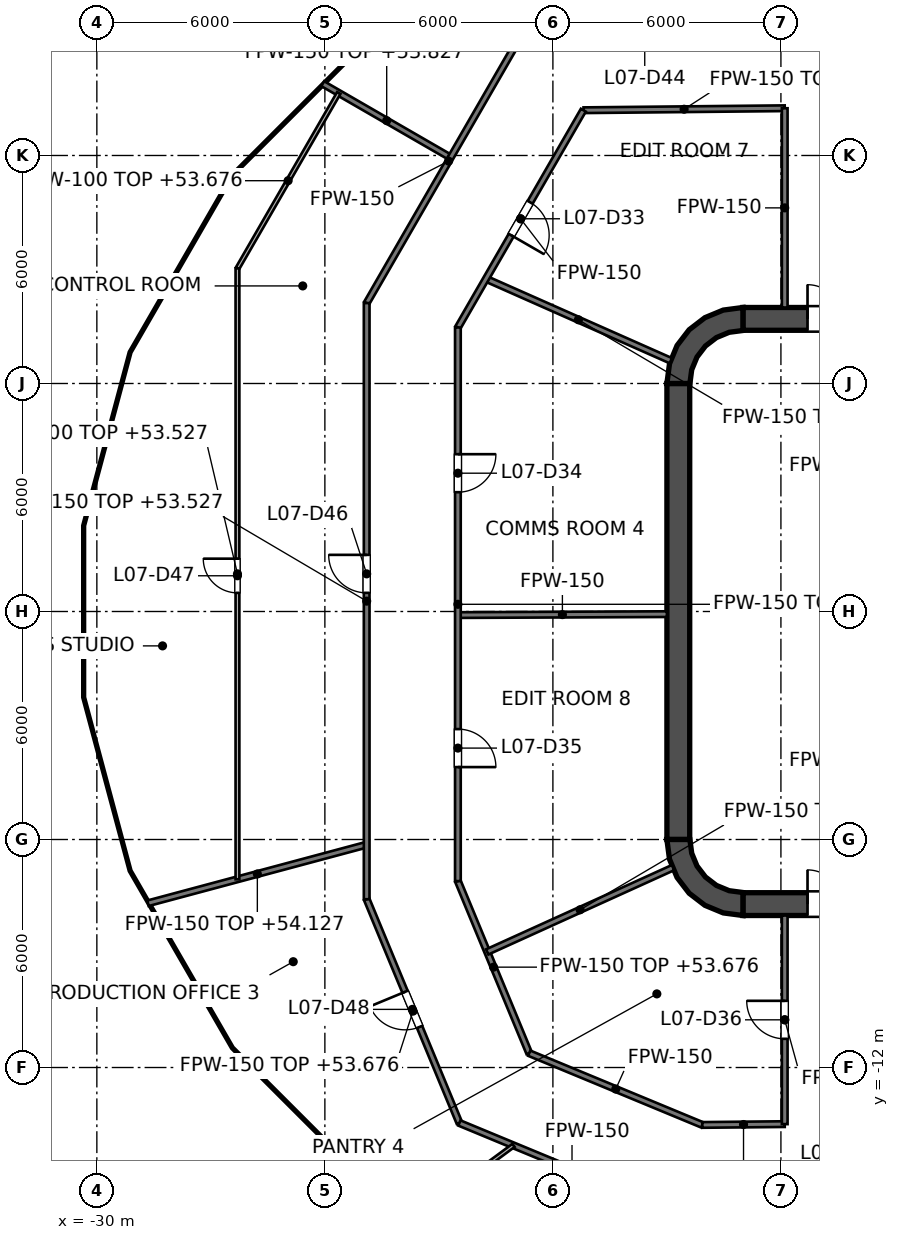
"""IFC4 building model, lengths in metres.
Left out: names, types, materials, properties, quantities, classifications, styles, units other than length and angle.
Written with IfcOpenShell. Run it as: python <this file> out.ifc"""

import sys

from ifc_helpers import new_model, si_unit, direction, frame, frame_2d, origin, place, context, subcontext, project, spatial, polyline, rectangle, outline, extrude, element, fill, save


model = new_model("IFC4")
c1 = context("Model", 3, precision=1e-05, world=origin(), true_north=direction((0.0, 1.0)))
c2 = subcontext(c1, "Body", "Model", "MODEL_VIEW")
j1 = project(units=[si_unit("LENGTHUNIT", "METRE"), si_unit("PLANEANGLEUNIT", "RADIAN")], contexts=[c1])
p1 = place(None, origin())
s1 = spatial("IfcSite", under=j1, at=p1, CompositionType="ELEMENT")
p2 = place(p1, origin())
s2 = spatial("IfcBuilding", under=s1, at=p2, CompositionType="ELEMENT")
p3 = place(p2, frame((0.0, 0.0, 50.4)))
s3 = spatial("IfcBuildingStorey", under=s2, at=p3, CompositionType="ELEMENT", Elevation=50.4)
p4 = place(p3, frame((-13.0, 7.7, 0.0), z_axis=(0.0, 0.0, 1.0), x_axis=(1.0, 0.0, 0.0)))
e1 = element("IfcWall", 1, at=p4, inside=s3, PredefinedType="SHEAR", context=c2, shape_type="SweptSolid", body=[
    extrude(rectangle(XDim=26.0, YDim=0.6, at=frame_2d((13.0, 0.0))), origin(), (0.0, 0.0, 1.0), 4.2),
])
p5 = place(p4, frame((1.7, 0.0, 0.0)))
e2 = element("IfcOpeningElement", 2, at=p5, cuts=e1, PredefinedType="OPENING", context=c2, shape_type="SweptSolid", body=[
    extrude(rectangle(XDim=1.8, YDim=2.1, at=frame_2d((0.9, 1.05))), frame((0.0, 0.3, 0.0), z_axis=(0.0, -1.0, 0.0), x_axis=(1.0, 0.0, 0.0)), (0.0, 0.0, 1.0), 0.6),
])
p6 = place(p4, frame((22.5, 0.0, 0.0)))
e3 = element("IfcOpeningElement", 3, at=p6, cuts=e1, PredefinedType="OPENING", context=c2, shape_type="SweptSolid", body=[
    extrude(rectangle(XDim=1.8, YDim=2.1, at=frame_2d((0.9, 1.05))), frame((0.0, 0.3, 0.0), z_axis=(0.0, -1.0, 0.0), x_axis=(1.0, 0.0, 0.0)), (0.0, 0.0, 1.0), 0.6),
])
p7 = place(p3, frame((-13.0, -7.7, 0.0), z_axis=(0.0, 0.0, 1.0), x_axis=(1.0, 0.0, 0.0)))
e4 = element("IfcWall", 4, at=p7, inside=s3, PredefinedType="SHEAR", context=c2, shape_type="SweptSolid", body=[
    extrude(rectangle(XDim=26.0, YDim=0.6, at=frame_2d((13.0, 0.0))), origin(), (0.0, 0.0, 1.0), 4.2),
])
p8 = place(p7, frame((1.7, 0.0, 0.0)))
e5 = element("IfcOpeningElement", 5, at=p8, cuts=e4, PredefinedType="OPENING", context=c2, shape_type="SweptSolid", body=[
    extrude(rectangle(XDim=1.8, YDim=2.1, at=frame_2d((0.9, 1.05))), frame((0.0, 0.3, 0.0), z_axis=(0.0, -1.0, 0.0), x_axis=(1.0, 0.0, 0.0)), (0.0, 0.0, 1.0), 0.6),
])
p9 = place(p7, frame((22.5, 0.0, 0.0)))
e6 = element("IfcOpeningElement", 6, at=p9, cuts=e4, PredefinedType="OPENING", context=c2, shape_type="SweptSolid", body=[
    extrude(rectangle(XDim=1.8, YDim=2.1, at=frame_2d((0.9, 1.05))), frame((0.0, 0.3, 0.0), z_axis=(0.0, -1.0, 0.0), x_axis=(1.0, 0.0, 0.0)), (0.0, 0.0, 1.0), 0.6),
])
p10 = place(p3, frame((-14.7, -6.0, 0.0), z_axis=(0.0, 0.0, 1.0), x_axis=(0.0, 1.0, 0.0)))
e7 = element("IfcWall", 7, at=p10, inside=s3, PredefinedType="SHEAR", context=c2, shape_type="SweptSolid", body=[
    extrude(rectangle(XDim=12.0, YDim=0.6, at=frame_2d((6.0, 0.0))), origin(), (0.0, 0.0, 1.0), 4.2),
])
p11 = place(p3, origin())
e8 = element("IfcWall", 8, at=p11, inside=s3, PredefinedType="SHEAR", context=c2, shape_type="SweptSolid", body=[
    extrude(outline(polyline([(-15.0, 6.0), (-14.395, 6.0), (-14.347, 6.361), (-14.208, 6.698), (-13.986, 6.986), (-13.698, 7.208), (-13.361, 7.347), (-13.0, 7.395), (-13.0, 8.0), (-13.518, 7.932), (-14.0, 7.732), (-14.414, 7.414), (-14.732, 7.0), (-14.932, 6.518), (-15.0, 6.0)])), origin(), (0.0, 0.0, 1.0), 4.2),
])
e9 = element("IfcWall", 9, at=p11, inside=s3, PredefinedType="SHEAR", context=c2, shape_type="SweptSolid", body=[
    extrude(outline(polyline([(-13.0, -8.0), (-13.0, -7.395), (-13.361, -7.347), (-13.698, -7.208), (-13.986, -6.986), (-14.208, -6.698), (-14.347, -6.361), (-14.395, -6.0), (-15.0, -6.0), (-14.932, -6.518), (-14.732, -7.0), (-14.414, -7.414), (-14.0, -7.732), (-13.518, -7.932), (-13.0, -8.0)])), origin(), (0.0, 0.0, 1.0), 4.2),
])
p12 = place(p3, frame((-11.8, -7.4, 0.0), z_axis=(0.0, 0.0, 1.0), x_axis=(0.0, 1.0, 0.0)))
e10 = element("IfcWall", 10, at=p12, inside=s3, PredefinedType="SOLIDWALL", context=c2, shape_type="SweptSolid", body=[
    extrude(rectangle(XDim=14.8, YDim=0.4, at=frame_2d((7.4, 0.0))), origin(), (0.0, 0.0, 1.0), 4.05),
])
p13 = place(p12, frame((11.2, 0.0, 0.0)))
e11 = element("IfcOpeningElement", 11, at=p13, cuts=e10, PredefinedType="OPENING", context=c2, shape_type="SweptSolid", body=[
    extrude(rectangle(XDim=1.1, YDim=2.1, at=frame_2d((0.55, 1.05))), frame((0.0, 0.2, 0.0), z_axis=(0.0, -1.0, 0.0), x_axis=(1.0, 0.0, 0.0)), (0.0, 0.0, 1.0), 0.4),
])
p14 = place(p12, frame((8.3, 0.0, 0.0)))
e12 = element("IfcOpeningElement", 12, at=p14, cuts=e10, PredefinedType="OPENING", context=c2, shape_type="SweptSolid", body=[
    extrude(rectangle(XDim=1.1, YDim=2.1, at=frame_2d((0.55, 1.05))), frame((0.0, 0.2, 0.0), z_axis=(0.0, -1.0, 0.0), x_axis=(1.0, 0.0, 0.0)), (0.0, 0.0, 1.0), 0.4),
])
p15 = place(p12, frame((5.4, 0.0, 0.0)))
e13 = element("IfcOpeningElement", 13, at=p15, cuts=e10, PredefinedType="OPENING", context=c2, shape_type="SweptSolid", body=[
    extrude(rectangle(XDim=1.1, YDim=2.1, at=frame_2d((0.55, 1.05))), frame((0.0, 0.2, 0.0), z_axis=(0.0, -1.0, 0.0), x_axis=(1.0, 0.0, 0.0)), (0.0, 0.0, 1.0), 0.4),
])
p16 = place(p12, frame((13.552, 0.0, 0.0)))
e14 = element("IfcOpeningElement", 14, at=p16, cuts=e10, PredefinedType="OPENING", context=c2, shape_type="SweptSolid", body=[
    extrude(rectangle(XDim=0.9, YDim=2.1, at=frame_2d((0.45, 1.05))), frame((0.0, 0.2, 0.0), z_axis=(0.0, -1.0, 0.0), x_axis=(1.0, 0.0, 0.0)), (0.0, 0.0, 1.0), 0.4),
])
p17 = place(p12, frame((0.347, 0.0, 0.0)))
e15 = element("IfcOpeningElement", 15, at=p17, cuts=e10, PredefinedType="OPENING", context=c2, shape_type="SweptSolid", body=[
    extrude(rectangle(XDim=0.9, YDim=2.1, at=frame_2d((0.45, 1.05))), frame((0.0, 0.2, 0.0), z_axis=(0.0, -1.0, 0.0), x_axis=(1.0, 0.0, 0.0)), (0.0, 0.0, 1.0), 0.4),
])
e16 = element("IfcWall", 16, at=p11, inside=s3, PredefinedType="SOLIDWALL", context=c2, shape_type="SweptSolid", body=[
    extrude(outline(polyline([(-12.0, -5.925), (-12.0, -5.675), (-14.15, -5.675), (-14.15, -3.025), (-12.0, -3.025), (-12.0, -2.775), (-14.15, -2.775), (-14.15, -0.125), (-12.0, -0.125), (-12.0, 0.125), (-14.15, 0.125), (-14.15, 2.775), (-12.0, 2.775), (-12.0, 3.025), (-14.15, 3.025), (-14.15, 5.675), (-12.0, 5.675), (-12.0, 5.925), (-14.15, 5.925), (-14.4, 5.925), (-14.4, 5.675), (-14.4, 3.025), (-14.4, 2.775), (-14.4, 0.125), (-14.4, -0.125), (-14.4, -2.775), (-14.4, -3.025), (-14.4, -5.675), (-14.4, -5.925), (-14.15, -5.925), (-12.0, -5.925)])), origin(), (0.0, 0.0, 1.0), 4.05),
])
p18 = place(p3, frame((-22.9, -7.572, 0.0), z_axis=(0.0, 0.0, 1.0), x_axis=(0.382860357704, -0.923806227788, 0.0)))
e17 = element("IfcWall", 17, at=p18, inside=s3, PredefinedType="PARTITIONING", context=c2, shape_type="SweptSolid", body=[
    extrude(rectangle(XDim=6.374, YDim=0.15, at=frame_2d((3.187, 0.0))), origin(), (0.0, 0.0, 1.0), 3.276),
])
p19 = place(p18, frame((2.637, 0.0, 0.0)))
e18 = element("IfcOpeningElement", 18, at=p19, cuts=e17, PredefinedType="OPENING", context=c2, shape_type="SweptSolid", body=[
    extrude(rectangle(XDim=1.0, YDim=2.1, at=frame_2d((0.5, 1.05))), frame((0.0, 0.075, 0.0), z_axis=(0.0, -1.0, 0.0), x_axis=(1.0, 0.0, 0.0)), (0.0, 0.0, 1.0), 0.15),
])
p20 = place(p3, frame((-20.5, -7.095, 0.0), z_axis=(0.0, 0.0, 1.0), x_axis=(0.382878184095, -0.923798839653, 0.0)))
e19 = element("IfcWall", 19, at=p20, inside=s3, PredefinedType="PARTITIONING", context=c2, shape_type="SweptSolid", body=[
    extrude(rectangle(XDim=4.902, YDim=0.15, at=frame_2d((2.451, 0.0))), origin(), (0.0, 0.0, 1.0), 3.276),
])
p21 = place(p3, frame((-24.056, 13.889, 0.0), z_axis=(0.0, 0.0, 1.0), x_axis=(0.865926134655, -0.500171899772, 0.0)))
e20 = element("IfcWall", 20, at=p21, inside=s3, PredefinedType="PARTITIONING", context=c2, shape_type="SweptSolid", body=[
    extrude(rectangle(XDim=3.887, YDim=0.15, at=frame_2d((1.943, 0.0))), origin(), (0.0, 0.0, 1.0), 3.427),
])
p22 = place(p3, frame((-19.76, 8.755, 0.0), z_axis=(0.0, 0.0, 1.0), x_axis=(0.91424834547, -0.405154245695, 0.0)))
e21 = element("IfcWall", 21, at=p22, inside=s3, PredefinedType="PARTITIONING", context=c2, shape_type="SweptSolid", body=[
    extrude(rectangle(XDim=5.318, YDim=0.15, at=frame_2d((2.659, 0.0))), origin(), (0.0, 0.0, 1.0), 3.276),
])
p23 = place(p3, frame((-20.46, -13.46, 0.0), z_axis=(0.0, 0.0, 1.0), x_axis=(0.9237825057, -0.382917591869, 0.0)))
e22 = element("IfcWall", 22, at=p23, inside=s3, PredefinedType="PARTITIONING", context=c2, shape_type="SweptSolid", body=[
    extrude(rectangle(XDim=6.415, YDim=0.15, at=frame_2d((3.208, 0.0))), origin(), (0.0, 0.0, 1.0), 3.195),
])
p24 = place(p3, frame((-18.623, -11.623, 0.0), z_axis=(0.0, 0.0, 1.0), x_axis=(0.923791670587, -0.38289548098, 0.0)))
e23 = element("IfcWall", 23, at=p24, inside=s3, PredefinedType="PARTITIONING", context=c2, shape_type="SweptSolid", body=[
    extrude(rectangle(XDim=4.931, YDim=0.15, at=frame_2d((2.465, 0.0))), origin(), (0.0, 0.0, 1.0), 3.195),
])
p25 = place(p3, frame((-20.5, -0.094, 0.0), z_axis=(0.0, 0.0, 1.0), x_axis=(0.999990148138, 0.004438876723, 0.0)))
e24 = element("IfcWall", 24, at=p25, inside=s3, PredefinedType="PARTITIONING", context=c2, shape_type="SweptSolid", body=[
    extrude(rectangle(XDim=5.5, YDim=0.15, at=frame_2d((2.75, 0.0))), origin(), (0.0, 0.0, 1.0), 3.195),
])
p26 = place(p3, frame((-14.068, -13.511, 0.0), z_axis=(0.0, 0.0, 1.0), x_axis=(0.999950911515, 0.009908307647, 0.0)))
e25 = element("IfcWall", 25, at=p26, inside=s3, PredefinedType="PARTITIONING", context=c2, shape_type="SweptSolid", body=[
    extrude(rectangle(XDim=2.168, YDim=0.15, at=frame_2d((1.084, 0.0))), origin(), (0.0, 0.0, 1.0), 3.276),
])
p27 = place(p3, frame((-17.194, 13.191, 0.0), z_axis=(0.0, 0.0, 1.0), x_axis=(0.999950853109, 0.009914200296, 0.0)))
e26 = element("IfcWall", 26, at=p27, inside=s3, PredefinedType="PARTITIONING", context=c2, shape_type="SweptSolid", body=[
    extrude(rectangle(XDim=5.294, YDim=0.15, at=frame_2d((2.647, 0.0))), origin(), (0.0, 0.0, 1.0), 3.276),
])
p28 = place(p3, frame((-28.654, -7.678, 0.0), z_axis=(0.0, 0.0, 1.0), x_axis=(0.965918597777, 0.258846020771, 0.0)))
e27 = element("IfcWall", 27, at=p28, inside=s3, PredefinedType="PARTITIONING", context=c2, shape_type="SweptSolid", body=[
    extrude(rectangle(XDim=5.957, YDim=0.15, at=frame_2d((2.979, 0.0))), origin(), (0.0, 0.0, 1.0), 3.727),
])
p29 = place(p3, frame((-19.728, -8.958, 0.0), z_axis=(0.0, 0.0, 1.0), x_axis=(0.910629511797, 0.413223779863, 0.0)))
e28 = element("IfcWall", 28, at=p29, inside=s3, PredefinedType="PARTITIONING", context=c2, shape_type="SweptSolid", body=[
    extrude(rectangle(XDim=5.368, YDim=0.15, at=frame_2d((2.684, 0.0))), origin(), (0.0, 0.0, 1.0), 4.05),
])
p30 = place(p3, frame((-20.5, 7.474, 0.0), z_axis=(0.0, 0.0, 1.0), x_axis=(0.500012665616, 0.866018091164, 0.0)))
e29 = element("IfcWall", 29, at=p30, inside=s3, PredefinedType="PARTITIONING", context=c2, shape_type="SweptSolid", body=[
    extrude(rectangle(XDim=6.602, YDim=0.15, at=frame_2d((3.301, 0.0))), origin(), (0.0, 0.0, 1.0), 3.195),
])
p31 = place(p30, frame((2.803, 0.0, 0.0)))
e30 = element("IfcOpeningElement", 30, at=p31, cuts=e29, PredefinedType="OPENING", context=c2, shape_type="SweptSolid", body=[
    extrude(rectangle(XDim=1.0, YDim=2.1, at=frame_2d((0.5, 1.05))), frame((0.0, 0.075, 0.0), z_axis=(0.0, -1.0, 0.0), x_axis=(1.0, 0.0, 0.0)), (0.0, 0.0, 1.0), 0.15),
])
p32 = place(p3, frame((-22.9, 8.117, 0.0), z_axis=(0.0, 0.0, 1.0), x_axis=(0.5000050195, 0.866022505755, 0.0)))
e31 = element("IfcWall", 31, at=p32, inside=s3, PredefinedType="PARTITIONING", context=c2, shape_type="SweptSolid", body=[
    extrude(rectangle(XDim=8.626, YDim=0.15, at=frame_2d((4.313, 0.0))), origin(), (0.0, 0.0, 1.0), 3.195),
])
p33 = place(p3, frame((-11.9, -13.49, 0.0), z_axis=(0.0, 0.0, 1.0), x_axis=(0.0, 1.0, 0.0)))
e32 = element("IfcWall", 32, at=p33, inside=s3, PredefinedType="PARTITIONING", context=c2, shape_type="SweptSolid", body=[
    extrude(rectangle(XDim=5.49, YDim=0.15, at=frame_2d((2.745, 0.0))), origin(), (0.0, 0.0, 1.0), 3.195),
])
p34 = place(p33, frame((2.245, 0.0, 0.0)))
e33 = element("IfcOpeningElement", 33, at=p34, cuts=e32, PredefinedType="OPENING", context=c2, shape_type="SweptSolid", body=[
    extrude(rectangle(XDim=1.0, YDim=2.1, at=frame_2d((0.5, 1.05))), frame((0.0, 0.075, 0.0), z_axis=(0.0, -1.0, 0.0), x_axis=(1.0, 0.0, 0.0)), (0.0, 0.0, 1.0), 0.15),
])
p35 = place(p3, frame((-11.9, 8.0, 0.0), z_axis=(0.0, 0.0, 1.0), x_axis=(0.0, 1.0, 0.0)))
e34 = element("IfcWall", 34, at=p35, inside=s3, PredefinedType="PARTITIONING", context=c2, shape_type="SweptSolid", body=[
    extrude(rectangle(XDim=5.243, YDim=0.15, at=frame_2d((2.622, 0.0))), origin(), (0.0, 0.0, 1.0), 3.195),
])
p36 = place(p3, frame((-20.5, -7.095, 0.0), z_axis=(0.0, 0.0, 1.0), x_axis=(0.0, 1.0, 0.0)))
e35 = element("IfcWall", 35, at=p36, inside=s3, PredefinedType="PARTITIONING", context=c2, shape_type="SweptSolid", body=[
    extrude(rectangle(XDim=14.569, YDim=0.15, at=frame_2d((7.285, 0.0))), origin(), (0.0, 0.0, 1.0), 3.127),
])
p37 = place(p36, frame((10.234, 0.0, 0.0)))
e36 = element("IfcOpeningElement", 36, at=p37, cuts=e35, PredefinedType="OPENING", context=c2, shape_type="SweptSolid", body=[
    extrude(rectangle(XDim=1.0, YDim=2.1, at=frame_2d((0.5, 1.05))), frame((0.0, 0.075, 0.0), z_axis=(0.0, -1.0, 0.0), x_axis=(1.0, 0.0, 0.0)), (0.0, 0.0, 1.0), 0.15),
])
p38 = place(p36, frame((3.0, 0.0, 0.0)))
e37 = element("IfcOpeningElement", 37, at=p38, cuts=e35, PredefinedType="OPENING", context=c2, shape_type="SweptSolid", body=[
    extrude(rectangle(XDim=1.0, YDim=2.1, at=frame_2d((0.5, 1.05))), frame((0.0, 0.075, 0.0), z_axis=(0.0, -1.0, 0.0), x_axis=(1.0, 0.0, 0.0)), (0.0, 0.0, 1.0), 0.15),
])
p39 = place(p3, frame((-22.9, -7.572, 0.0), z_axis=(0.0, 0.0, 1.0), x_axis=(0.0, 1.0, 0.0)))
e38 = element("IfcWall", 38, at=p39, inside=s3, PredefinedType="PARTITIONING", context=c2, shape_type="SweptSolid", body=[
    extrude(rectangle(XDim=15.689, YDim=0.15, at=frame_2d((7.844, 0.0))), origin(), (0.0, 0.0, 1.0), 3.127),
])
p40 = place(p39, frame((8.062, 0.0, 0.0)))
e39 = element("IfcOpeningElement", 39, at=p40, cuts=e38, PredefinedType="OPENING", context=c2, shape_type="SweptSolid", body=[
    extrude(rectangle(XDim=1.0, YDim=2.1, at=frame_2d((0.5, 1.05))), frame((0.0, 0.075, 0.0), z_axis=(0.0, -1.0, 0.0), x_axis=(1.0, 0.0, 0.0)), (0.0, 0.0, 1.0), 0.15),
])
p41 = place(p3, frame((-21.832, -16.113, 0.0), z_axis=(0.0, 0.0, 1.0), x_axis=(0.804564485305, 0.59386529532, 0.0)))
e40 = element("IfcWall", 40, at=p41, inside=s3, PredefinedType="PARTITIONING", context=c2, shape_type="SweptSolid", body=[
    extrude(rectangle(XDim=3.474, YDim=0.1, at=frame_2d((1.737, 0.0))), origin(), (0.0, 0.0, 1.0), 3.195),
])
p42 = place(p3, frame((-26.3, 9.028, 0.0), z_axis=(0.0, 0.0, 1.0), x_axis=(0.500059382915, 0.865991116328, 0.0)))
e41 = element("IfcWall", 41, at=p42, inside=s3, PredefinedType="PARTITIONING", context=c2, shape_type="SweptSolid", body=[
    extrude(rectangle(XDim=5.331, YDim=0.1, at=frame_2d((2.666, 0.0))), origin(), (0.0, 0.0, 1.0), 3.276),
])
p43 = place(p3, frame((-26.3, -7.047, 0.0), z_axis=(0.0, 0.0, 1.0), x_axis=(0.0, 1.0, 0.0)))
e42 = element("IfcWall", 42, at=p43, inside=s3, PredefinedType="PARTITIONING", context=c2, shape_type="SweptSolid", body=[
    extrude(rectangle(XDim=16.075, YDim=0.1, at=frame_2d((8.038, 0.0))), origin(), (0.0, 0.0, 1.0), 3.127),
])
p44 = place(p43, frame((7.537, 0.0, 0.0)))
e43 = element("IfcOpeningElement", 43, at=p44, cuts=e42, PredefinedType="OPENING", context=c2, shape_type="SweptSolid", body=[
    extrude(rectangle(XDim=0.9, YDim=2.1, at=frame_2d((0.45, 1.05))), frame((0.0, 0.05, 0.0), z_axis=(0.0, -1.0, 0.0), x_axis=(1.0, 0.0, 0.0)), (0.0, 0.0, 1.0), 0.1),
])
p45 = place(p13, origin())
e44 = element("IfcDoor", 44, at=p45, inside=s3, OperationType="DOUBLE_DOOR_SLIDING", PredefinedType="DOOR", context=c2, shape_type="SweptSolid", body=[
    extrude(rectangle(XDim=1.1, YDim=2.1, at=frame_2d((0.55, 1.05))), frame((0.0, 0.025, 0.0), z_axis=(0.0, -1.0, 0.0), x_axis=(1.0, 0.0, 0.0)), (0.0, 0.0, 1.0), 0.05),
])
fill(e11, e44)
p46 = place(p14, origin())
e45 = element("IfcDoor", 45, at=p46, inside=s3, OperationType="DOUBLE_DOOR_SLIDING", PredefinedType="DOOR", context=c2, shape_type="SweptSolid", body=[
    extrude(rectangle(XDim=1.1, YDim=2.1, at=frame_2d((0.55, 1.05))), frame((0.0, 0.025, 0.0), z_axis=(0.0, -1.0, 0.0), x_axis=(1.0, 0.0, 0.0)), (0.0, 0.0, 1.0), 0.05),
])
fill(e12, e45)
p47 = place(p15, origin())
e46 = element("IfcDoor", 46, at=p47, inside=s3, OperationType="DOUBLE_DOOR_SLIDING", PredefinedType="DOOR", context=c2, shape_type="SweptSolid", body=[
    extrude(rectangle(XDim=1.1, YDim=2.1, at=frame_2d((0.55, 1.05))), frame((0.0, 0.025, 0.0), z_axis=(0.0, -1.0, 0.0), x_axis=(1.0, 0.0, 0.0)), (0.0, 0.0, 1.0), 0.05),
])
fill(e13, e46)
p48 = place(p16, origin())
e47 = element("IfcDoor", 47, at=p48, inside=s3, OperationType="SINGLE_SWING_LEFT", PredefinedType="DOOR", context=c2, shape_type="SweptSolid", body=[
    extrude(rectangle(XDim=0.9, YDim=2.1, at=frame_2d((0.45, 1.05))), frame((0.0, 0.025, 0.0), z_axis=(0.0, -1.0, 0.0), x_axis=(1.0, 0.0, 0.0)), (0.0, 0.0, 1.0), 0.05),
])
fill(e14, e47)
p49 = place(p17, origin())
e48 = element("IfcDoor", 48, at=p49, inside=s3, OperationType="SINGLE_SWING_LEFT", PredefinedType="DOOR", context=c2, shape_type="SweptSolid", body=[
    extrude(rectangle(XDim=0.9, YDim=2.1, at=frame_2d((0.45, 1.05))), frame((0.0, 0.025, 0.0), z_axis=(0.0, -1.0, 0.0), x_axis=(1.0, 0.0, 0.0)), (0.0, 0.0, 1.0), 0.05),
])
fill(e15, e48)
p50 = place(p5, origin())
e49 = element("IfcDoor", 49, at=p50, inside=s3, OperationType="DOUBLE_DOOR_SINGLE_SWING", PredefinedType="DOOR", context=c2, shape_type="SweptSolid", body=[
    extrude(rectangle(XDim=1.8, YDim=2.1, at=frame_2d((0.9, 1.05))), frame((0.0, 0.025, 0.0), z_axis=(0.0, -1.0, 0.0), x_axis=(1.0, 0.0, 0.0)), (0.0, 0.0, 1.0), 0.05),
])
fill(e2, e49)
p51 = place(p8, origin())
e50 = element("IfcDoor", 50, at=p51, inside=s3, OperationType="DOUBLE_DOOR_SINGLE_SWING", PredefinedType="DOOR", context=c2, shape_type="SweptSolid", body=[
    extrude(rectangle(XDim=1.8, YDim=2.1, at=frame_2d((0.9, 1.05))), frame((0.0, 0.025, 0.0), z_axis=(0.0, -1.0, 0.0), x_axis=(1.0, 0.0, 0.0)), (0.0, 0.0, 1.0), 0.05),
])
fill(e5, e50)
p52 = place(p31, origin())
e51 = element("IfcDoor", 51, at=p52, inside=s3, OperationType="SINGLE_SWING_LEFT", PredefinedType="DOOR", context=c2, shape_type="SweptSolid", body=[
    extrude(rectangle(XDim=1.0, YDim=2.1, at=frame_2d((0.5, 1.05))), frame((0.0, 0.025, 0.0), z_axis=(0.0, -1.0, 0.0), x_axis=(1.0, 0.0, 0.0)), (0.0, 0.0, 1.0), 0.05),
])
fill(e30, e51)
p53 = place(p37, origin())
e52 = element("IfcDoor", 52, at=p53, inside=s3, OperationType="SINGLE_SWING_RIGHT", PredefinedType="DOOR", context=c2, shape_type="SweptSolid", body=[
    extrude(rectangle(XDim=1.0, YDim=2.1, at=frame_2d((0.5, 1.05))), frame((0.0, 0.025, 0.0), z_axis=(0.0, -1.0, 0.0), x_axis=(1.0, 0.0, 0.0)), (0.0, 0.0, 1.0), 0.05),
])
fill(e36, e52)
p54 = place(p38, origin())
e53 = element("IfcDoor", 53, at=p54, inside=s3, OperationType="SINGLE_SWING_LEFT", PredefinedType="DOOR", context=c2, shape_type="SweptSolid", body=[
    extrude(rectangle(XDim=1.0, YDim=2.1, at=frame_2d((0.5, 1.05))), frame((0.0, 0.025, 0.0), z_axis=(0.0, -1.0, 0.0), x_axis=(1.0, 0.0, 0.0)), (0.0, 0.0, 1.0), 0.05),
])
fill(e37, e53)
p55 = place(p34, origin())
e54 = element("IfcDoor", 54, at=p55, inside=s3, OperationType="SINGLE_SWING_RIGHT", PredefinedType="DOOR", context=c2, shape_type="SweptSolid", body=[
    extrude(rectangle(XDim=1.0, YDim=2.1, at=frame_2d((0.5, 1.05))), frame((0.0, 0.025, 0.0), z_axis=(0.0, -1.0, 0.0), x_axis=(1.0, 0.0, 0.0)), (0.0, 0.0, 1.0), 0.05),
])
fill(e33, e54)
p56 = place(p40, origin())
e55 = element("IfcDoor", 55, at=p56, inside=s3, OperationType="SINGLE_SWING_RIGHT", PredefinedType="DOOR", context=c2, shape_type="SweptSolid", body=[
    extrude(rectangle(XDim=1.0, YDim=2.1, at=frame_2d((0.5, 1.05))), frame((0.0, 0.025, 0.0), z_axis=(0.0, -1.0, 0.0), x_axis=(1.0, 0.0, 0.0)), (0.0, 0.0, 1.0), 0.05),
])
fill(e39, e55)
p57 = place(p44, origin())
e56 = element("IfcDoor", 56, at=p57, inside=s3, OperationType="SINGLE_SWING_RIGHT", PredefinedType="DOOR", context=c2, shape_type="SweptSolid", body=[
    extrude(rectangle(XDim=0.9, YDim=2.1, at=frame_2d((0.45, 1.05))), frame((0.0, 0.025, 0.0), z_axis=(0.0, -1.0, 0.0), x_axis=(1.0, 0.0, 0.0)), (0.0, 0.0, 1.0), 0.05),
])
fill(e43, e56)
p58 = place(p19, origin())
e57 = element("IfcDoor", 57, at=p58, inside=s3, OperationType="SINGLE_SWING_LEFT", PredefinedType="DOOR", context=c2, shape_type="SweptSolid", body=[
    extrude(rectangle(XDim=1.0, YDim=2.1, at=frame_2d((0.5, 1.05))), frame((0.0, 0.025, 0.0), z_axis=(0.0, -1.0, 0.0), x_axis=(1.0, 0.0, 0.0)), (0.0, 0.0, 1.0), 0.05),
])
fill(e18, e57)
save(model, sys.argv[1])
